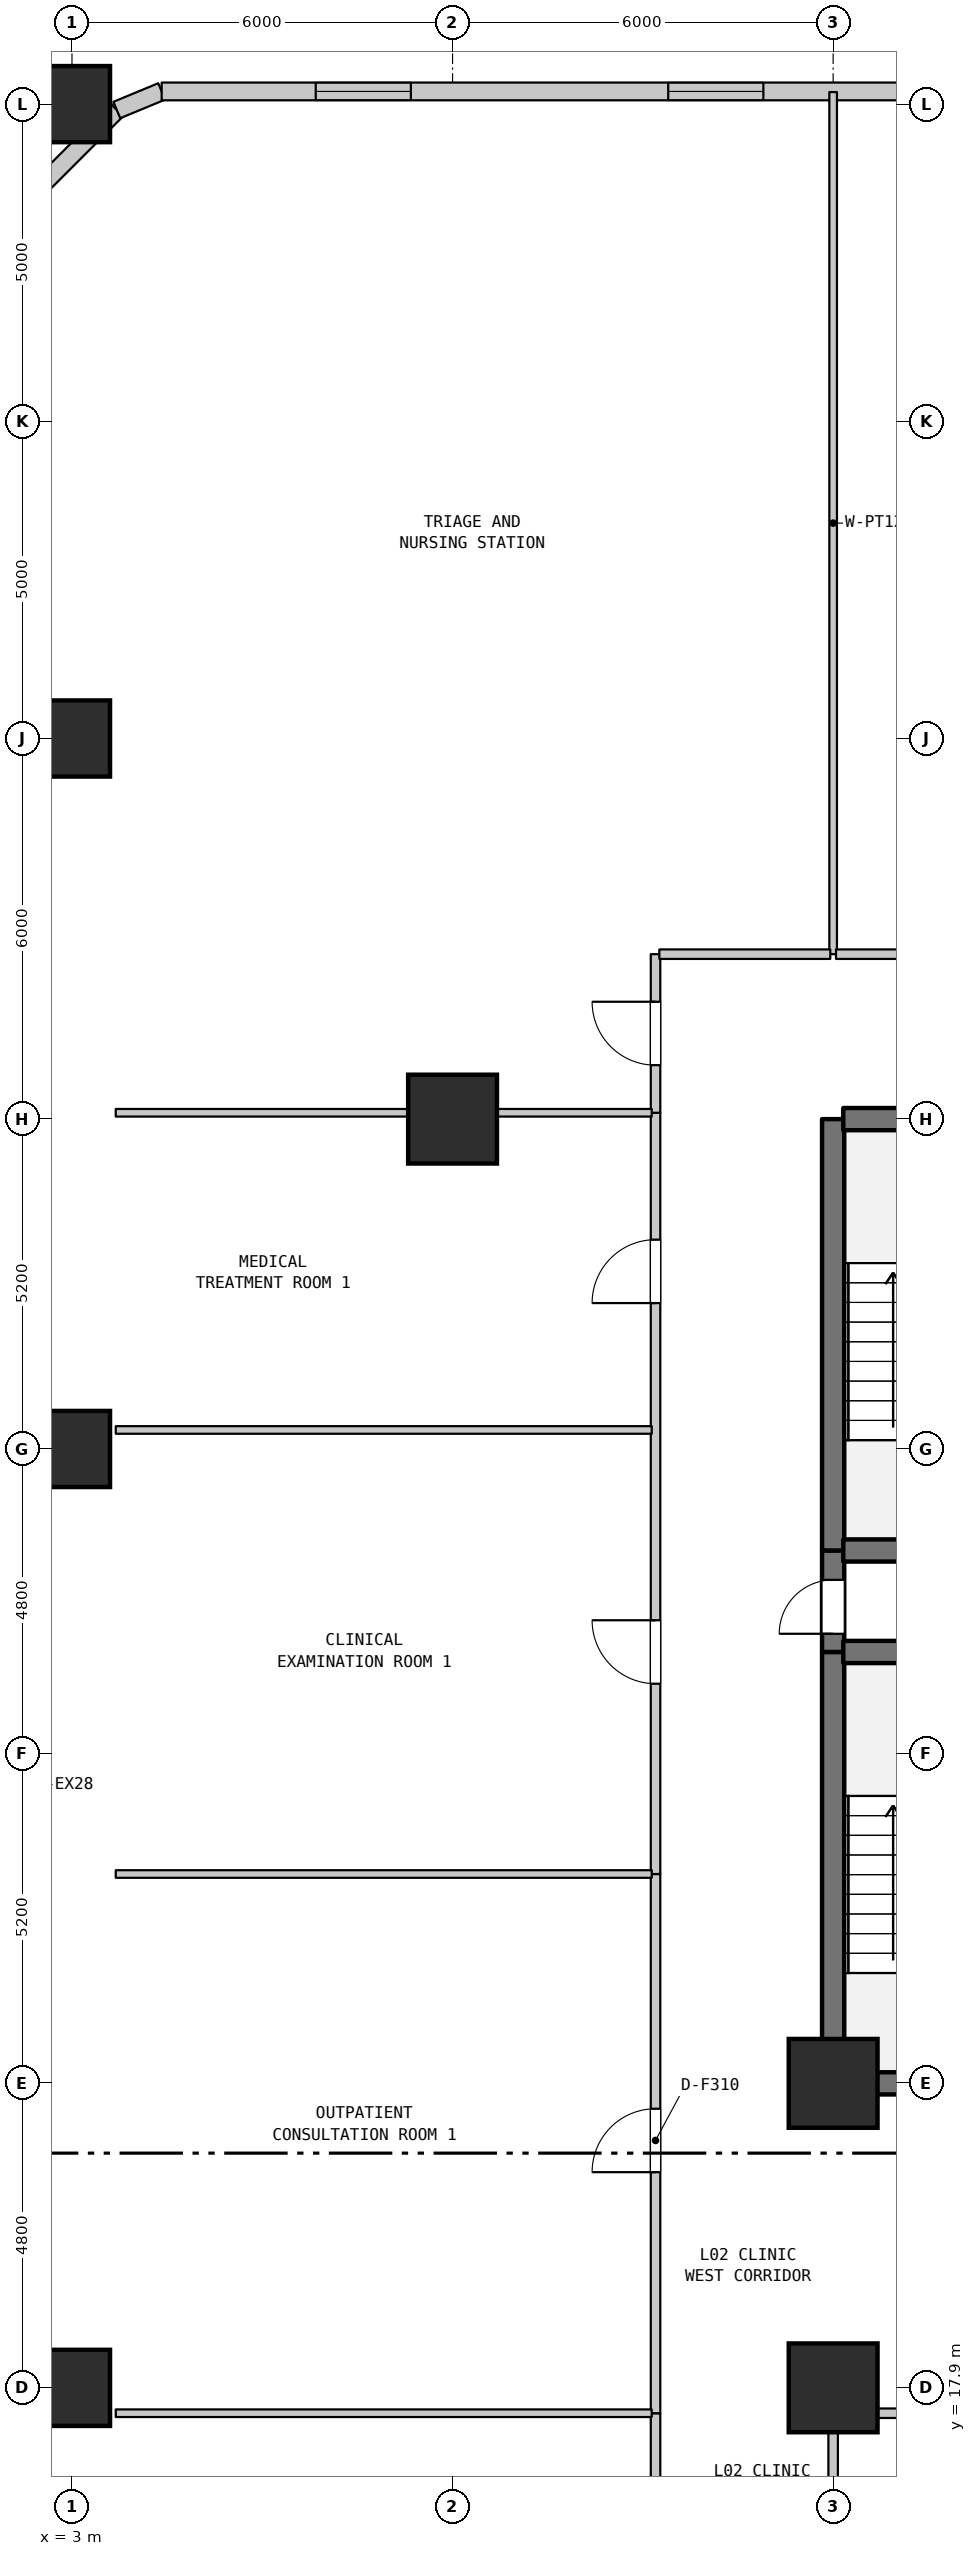
"""IFC4 building model, lengths in metres.
Left out: names, types, materials, properties, quantities, classifications, styles, units other than length and angle.
Written with IfcOpenShell. Run it as: python <this file> out.ifc"""

import sys

from ifc_helpers import new_model, si_unit, direction, frame, frame_2d, origin, origin_2d, place, context, subcontext, project, spatial, rectangle, extrude, element, fill, save


model = new_model("IFC4")
c1 = context("Model", 3, precision=1e-05, world=origin(), true_north=direction((0.0, 1.0)))
c2 = subcontext(c1, "Body", "Model", "MODEL_VIEW")
j1 = project(units=[si_unit("LENGTHUNIT", "METRE"), si_unit("PLANEANGLEUNIT", "RADIAN")], contexts=[c1])
p1 = place(None, origin())
s1 = spatial("IfcSite", under=j1, at=p1, CompositionType="ELEMENT")
p2 = place(p1, origin())
s2 = spatial("IfcBuilding", under=s1, at=p2, CompositionType="ELEMENT")
p3 = place(p2, frame((0.0, 0.0, 13.0)))
s3 = spatial("IfcBuildingStorey", under=s2, at=p3, CompositionType="ELEMENT", Elevation=13.0)
for number, where, z_axis, x_axis in (
    (1, (3.0, 17.9, 0.0), (0.0, 0.0, 1.0), (1.0, 0.0, 0.0)),
    (2, (3.0, 32.7, 0.0), (0.0, 0.0, 1.0), (1.0, 0.0, 0.0)),
    (3, (3.0, 43.9, 0.0), (0.0, 0.0, 1.0), (1.0, 0.0, 0.0)),
    (4, (3.0, 53.9, 0.0), (0.0, 0.0, 1.0), (1.0, 0.0, 0.0)),
):
    element("IfcColumn", number, at=place(p3, frame(where, z_axis=z_axis, x_axis=x_axis)), inside=s3, PredefinedType="PILASTER", context=c2, shape_type="SweptSolid", body=[
        extrude(rectangle(XDim=1.2, YDim=1.2, at=origin_2d()), origin(), (0.0, 0.0, 1.0), 6.0),
    ])
for number, where, z_axis, x_axis in (
    (5, (9.0, 37.9, 0.0), (0.0, 0.0, 1.0), (1.0, 0.0, 0.0)),
    (6, (15.0, 17.9, 0.0), (0.0, 0.0, 1.0), (1.0, 0.0, 0.0)),
    (7, (15.0, 22.7, 0.0), (0.0, 0.0, 1.0), (1.0, 0.0, 0.0)),
):
    element("IfcColumn", number, at=place(p3, frame(where, z_axis=z_axis, x_axis=x_axis)), inside=s3, PredefinedType="COLUMN", context=c2, shape_type="SweptSolid", body=[
        extrude(rectangle(XDim=1.4, YDim=1.4, at=origin_2d()), origin(), (0.0, 0.0, 1.0), 6.0),
    ])
p4 = place(p3, frame((2.293, 52.393, 0.0), z_axis=(0.0, 0.0, 1.0), x_axis=(0.707167825498, 0.707045731605, 0.0)))
e8 = element("IfcWall", 8, at=p4, inside=s3, PredefinedType="STANDARD", context=c2, shape_type="SweptSolid", body=[
    extrude(rectangle(XDim=2.0, YDim=0.28, at=frame_2d((1.0, 0.0))), origin(), (0.0, 0.0, 1.0), 5.58),
])
p5 = place(p3, frame((3.707, 53.807, 0.0), z_axis=(0.0, 0.0, 1.0), x_axis=(0.923717339373, 0.383074766777, 0.0)))
e9 = element("IfcWall", 9, at=p5, inside=s3, PredefinedType="STANDARD", context=c2, shape_type="SweptSolid", body=[
    extrude(rectangle(XDim=0.765, YDim=0.28, at=frame_2d((0.383, 0.0))), origin(), (0.0, 0.0, 1.0), 5.58),
])
p6 = place(p3, frame((4.414, 54.1, 0.0), z_axis=(0.0, 0.0, 1.0), x_axis=(1.0, 0.0, 0.0)))
e10 = element("IfcWall", 10, at=p6, inside=s3, PredefinedType="STANDARD", context=c2, shape_type="SweptSolid", body=[
    extrude(rectangle(XDim=28.586, YDim=0.28, at=frame_2d((14.293, 0.0))), origin(), (0.0, 0.0, 1.0), 5.58),
])
p7 = place(p6, frame((2.429, 0.0, 0.95)))
e11 = element("IfcOpeningElement", 11, at=p7, cuts=e10, PredefinedType="OPENING", context=c2, shape_type="SweptSolid", body=[
    extrude(rectangle(XDim=1.5, YDim=1.8, at=frame_2d((0.75, 0.9))), frame((0.0, 0.15, 0.0), z_axis=(0.0, -1.0, 0.0), x_axis=(1.0, 0.0, 0.0)), (0.0, 0.0, 1.0), 0.3),
])
p8 = place(p6, frame((7.986, 0.0, 0.95)))
e12 = element("IfcOpeningElement", 12, at=p8, cuts=e10, PredefinedType="OPENING", context=c2, shape_type="SweptSolid", body=[
    extrude(rectangle(XDim=1.5, YDim=1.8, at=frame_2d((0.75, 0.9))), frame((0.0, 0.15, 0.0), z_axis=(0.0, -1.0, 0.0), x_axis=(1.0, 0.0, 0.0)), (0.0, 0.0, 1.0), 0.3),
])
p9 = place(p6, frame((13.543, 0.0, 0.95)))
e13 = element("IfcOpeningElement", 13, at=p9, cuts=e10, PredefinedType="OPENING", context=c2, shape_type="SweptSolid", body=[
    extrude(rectangle(XDim=1.5, YDim=1.8, at=frame_2d((0.75, 0.9))), frame((0.0, 0.15, 0.0), z_axis=(0.0, -1.0, 0.0), x_axis=(1.0, 0.0, 0.0)), (0.0, 0.0, 1.0), 0.3),
])
p10 = place(p6, frame((19.55, 0.0, 0.95)))
e14 = element("IfcOpeningElement", 14, at=p10, cuts=e10, PredefinedType="OPENING", context=c2, shape_type="SweptSolid", body=[
    extrude(rectangle(XDim=1.5, YDim=1.8, at=frame_2d((0.75, 0.9))), frame((0.0, 0.15, 0.0), z_axis=(0.0, -1.0, 0.0), x_axis=(1.0, 0.0, 0.0)), (0.0, 0.0, 1.0), 0.3),
])
p11 = place(p6, frame((24.657, 0.0, 0.95)))
e15 = element("IfcOpeningElement", 15, at=p11, cuts=e10, PredefinedType="OPENING", context=c2, shape_type="SweptSolid", body=[
    extrude(rectangle(XDim=1.5, YDim=1.8, at=frame_2d((0.75, 0.9))), frame((0.0, 0.15, 0.0), z_axis=(0.0, -1.0, 0.0), x_axis=(1.0, 0.0, 0.0)), (0.0, 0.0, 1.0), 0.3),
])
p12 = place(p3, frame((12.2, 12.7, 0.0), z_axis=(0.0, 0.0, 1.0), x_axis=(0.0, 1.0, 0.0)))
e16 = element("IfcWall", 16, at=p12, inside=s3, PredefinedType="STANDARD", context=c2, shape_type="SweptSolid", body=[
    extrude(rectangle(XDim=4.8, YDim=0.15, at=frame_2d((2.4, 0.0))), origin(), (0.0, 0.0, 1.0), 5.58),
])
p13 = place(p12, frame((1.529, 0.0, 0.0)))
e17 = element("IfcOpeningElement", 17, at=p13, cuts=e16, PredefinedType="OPENING", context=c2, shape_type="SweptSolid", body=[
    extrude(rectangle(XDim=1.45, YDim=2.2, at=frame_2d((0.725, 1.1))), frame((0.0, 0.085, 0.0), z_axis=(0.0, -1.0, 0.0), x_axis=(1.0, 0.0, 0.0)), (0.0, 0.0, 1.0), 0.17),
])
p14 = place(p3, frame((12.2, 17.5, 0.0), z_axis=(0.0, 0.0, 1.0), x_axis=(0.0, 1.0, 0.0)))
e18 = element("IfcWall", 18, at=p14, inside=s3, PredefinedType="STANDARD", context=c2, shape_type="SweptSolid", body=[
    extrude(rectangle(XDim=8.5, YDim=0.15, at=frame_2d((4.25, 0.0))), origin(), (0.0, 0.0, 1.0), 5.58),
])
p15 = place(p14, frame((3.8, 0.0, 0.0)))
e19 = element("IfcOpeningElement", 19, at=p15, cuts=e18, PredefinedType="OPENING", context=c2, shape_type="SweptSolid", body=[
    extrude(rectangle(XDim=1.0, YDim=2.15, at=frame_2d((0.5, 1.075))), frame((0.0, 0.085, 0.0), z_axis=(0.0, -1.0, 0.0), x_axis=(1.0, 0.0, 0.0)), (0.0, 0.0, 1.0), 0.17),
])
p16 = place(p3, frame((12.2, 26.0, 0.0), z_axis=(0.0, 0.0, 1.0), x_axis=(0.0, 1.0, 0.0)))
e20 = element("IfcWall", 20, at=p16, inside=s3, PredefinedType="STANDARD", context=c2, shape_type="SweptSolid", body=[
    extrude(rectangle(XDim=12.0, YDim=0.15, at=frame_2d((6.0, 0.0))), origin(), (0.0, 0.0, 1.0), 5.58),
])
p17 = place(p16, frame((3.0, 0.0, 0.0)))
e21 = element("IfcOpeningElement", 21, at=p17, cuts=e20, PredefinedType="OPENING", context=c2, shape_type="SweptSolid", body=[
    extrude(rectangle(XDim=1.0, YDim=2.15, at=frame_2d((0.5, 1.075))), frame((0.0, 0.085, 0.0), z_axis=(0.0, -1.0, 0.0), x_axis=(1.0, 0.0, 0.0)), (0.0, 0.0, 1.0), 0.17),
])
p18 = place(p16, frame((9.0, 0.0, 0.0)))
e22 = element("IfcOpeningElement", 22, at=p18, cuts=e20, PredefinedType="OPENING", context=c2, shape_type="SweptSolid", body=[
    extrude(rectangle(XDim=1.0, YDim=2.15, at=frame_2d((0.5, 1.075))), frame((0.0, 0.085, 0.0), z_axis=(0.0, -1.0, 0.0), x_axis=(1.0, 0.0, 0.0)), (0.0, 0.0, 1.0), 0.17),
])
p19 = place(p3, frame((12.2, 38.0, 0.0), z_axis=(0.0, 0.0, 1.0), x_axis=(0.0, 1.0, 0.0)))
e23 = element("IfcWall", 23, at=p19, inside=s3, PredefinedType="STANDARD", context=c2, shape_type="SweptSolid", body=[
    extrude(rectangle(XDim=2.5, YDim=0.15, at=frame_2d((1.25, 0.0))), origin(), (0.0, 0.0, 1.0), 5.58),
])
p20 = place(p19, frame((0.75, 0.0, 0.0)))
e24 = element("IfcOpeningElement", 24, at=p20, cuts=e23, PredefinedType="OPENING", context=c2, shape_type="SweptSolid", body=[
    extrude(rectangle(XDim=1.0, YDim=2.15, at=frame_2d((0.5, 1.075))), frame((0.0, 0.085, 0.0), z_axis=(0.0, -1.0, 0.0), x_axis=(1.0, 0.0, 0.0)), (0.0, 0.0, 1.0), 0.17),
])
p21 = place(p3, frame((15.0, 12.7, 0.0), z_axis=(0.0, 0.0, 1.0), x_axis=(0.0, 1.0, 0.0)))
e25 = element("IfcWall", 25, at=p21, inside=s3, PredefinedType="STANDARD", context=c2, shape_type="SweptSolid", body=[
    extrude(rectangle(XDim=4.8, YDim=0.15, at=frame_2d((2.4, 0.0))), origin(), (0.0, 0.0, 1.0), 5.08),
])
p22 = place(p3, frame((15.0, 22.7, 0.0), z_axis=(0.0, 0.0, 1.0), x_axis=(0.0, 1.0, 0.0)))
e26 = element("IfcWall", 26, at=p22, inside=s3, PredefinedType="SHEAR", context=c2, shape_type="SweptSolid", body=[
    extrude(rectangle(XDim=6.8, YDim=0.35, at=frame_2d((3.4, 0.0))), origin(), (0.0, 0.0, 1.0), 5.58),
])
p23 = place(p3, frame((15.0, 29.5, 0.0), z_axis=(0.0, 0.0, 1.0), x_axis=(0.0, 1.0, 0.0)))
e27 = element("IfcWall", 27, at=p23, inside=s3, PredefinedType="SHEAR", context=c2, shape_type="SweptSolid", body=[
    extrude(rectangle(XDim=1.6, YDim=0.35, at=frame_2d((0.8, 0.0))), origin(), (0.0, 0.0, 1.0), 5.58),
])
p24 = place(p23, frame((0.287, 0.0, 0.0)))
e28 = element("IfcOpeningElement", 28, at=p24, cuts=e27, PredefinedType="OPENING", context=c2, shape_type="SweptSolid", body=[
    extrude(rectangle(XDim=0.85, YDim=2.1, at=frame_2d((0.425, 1.05))), frame((0.0, 0.185, 0.0), z_axis=(0.0, -1.0, 0.0), x_axis=(1.0, 0.0, 0.0)), (0.0, 0.0, 1.0), 0.37),
])
p25 = place(p3, frame((15.0, 31.1, 0.0), z_axis=(0.0, 0.0, 1.0), x_axis=(0.0, 1.0, 0.0)))
e29 = element("IfcWall", 29, at=p25, inside=s3, PredefinedType="SHEAR", context=c2, shape_type="SweptSolid", body=[
    extrude(rectangle(XDim=6.8, YDim=0.35, at=frame_2d((3.4, 0.0))), origin(), (0.0, 0.0, 1.0), 5.58),
])
p26 = place(p3, frame((15.0, 40.5, 0.0), z_axis=(0.0, 0.0, 1.0), x_axis=(0.0, 1.0, 0.0)))
e30 = element("IfcWall", 30, at=p26, inside=s3, PredefinedType="PARTITIONING", context=c2, shape_type="SweptSolid", body=[
    extrude(rectangle(XDim=13.59, YDim=0.12, at=frame_2d((6.795, 0.0))), origin(), (0.0, 0.0, 1.0), 5.58),
])
p27 = place(p3, frame((3.69, 17.5, 0.0), z_axis=(0.0, 0.0, 1.0), x_axis=(1.0, 0.0, 0.0)))
e31 = element("IfcWall", 31, at=p27, inside=s3, PredefinedType="PARTITIONING", context=c2, shape_type="SweptSolid", body=[
    extrude(rectangle(XDim=8.45, YDim=0.12, at=frame_2d((4.225, 0.0))), origin(), (0.0, 0.0, 1.0), 4.38),
])
p28 = place(p3, frame((15.06, 17.5, 0.0), z_axis=(0.0, 0.0, 1.0), x_axis=(1.0, 0.0, 0.0)))
e32 = element("IfcWall", 32, at=p28, inside=s3, PredefinedType="STANDARD", context=c2, shape_type="SweptSolid", body=[
    extrude(rectangle(XDim=8.295, YDim=0.15, at=frame_2d((4.147, 0.0))), origin(), (0.0, 0.0, 1.0), 5.58),
])
p29 = place(p28, frame((1.665, 0.0, 0.0)))
e33 = element("IfcOpeningElement", 33, at=p29, cuts=e32, PredefinedType="OPENING", context=c2, shape_type="SweptSolid", body=[
    extrude(rectangle(XDim=0.9, YDim=2.1, at=frame_2d((0.45, 1.05))), frame((0.0, 0.085, 0.0), z_axis=(0.0, -1.0, 0.0), x_axis=(1.0, 0.0, 0.0)), (0.0, 0.0, 1.0), 0.17),
])
p30 = place(p28, frame((5.715, 0.0, 0.0)))
e34 = element("IfcOpeningElement", 34, at=p30, cuts=e32, PredefinedType="OPENING", context=c2, shape_type="SweptSolid", body=[
    extrude(rectangle(XDim=0.9, YDim=2.1, at=frame_2d((0.45, 1.05))), frame((0.0, 0.085, 0.0), z_axis=(0.0, -1.0, 0.0), x_axis=(1.0, 0.0, 0.0)), (0.0, 0.0, 1.0), 0.17),
])
p31 = place(p3, frame((15.16, 22.7, 0.0), z_axis=(0.0, 0.0, 1.0), x_axis=(1.0, 0.0, 0.0)))
e35 = element("IfcWall", 35, at=p31, inside=s3, PredefinedType="SHEAR", context=c2, shape_type="SweptSolid", body=[
    extrude(rectangle(XDim=3.68, YDim=0.35, at=frame_2d((1.84, 0.0))), origin(), (0.0, 0.0, 1.0), 5.58),
])
p32 = place(p3, frame((3.69, 26.0, 0.0), z_axis=(0.0, 0.0, 1.0), x_axis=(1.0, 0.0, 0.0)))
e36 = element("IfcWall", 36, at=p32, inside=s3, PredefinedType="PARTITIONING", context=c2, shape_type="SweptSolid", body=[
    extrude(rectangle(XDim=8.45, YDim=0.12, at=frame_2d((4.225, 0.0))), origin(), (0.0, 0.0, 1.0), 5.58),
])
for number, where, z_axis, x_axis in (
    (37, (15.16, 29.5, 0.0), (0.0, 0.0, 1.0), (1.0, 0.0, 0.0)),
    (38, (15.16, 31.1, 0.0), (0.0, 0.0, 1.0), (1.0, 0.0, 0.0)),
):
    element("IfcWall", number, at=place(p3, frame(where, z_axis=z_axis, x_axis=x_axis)), inside=s3, PredefinedType="SHEAR", context=c2, shape_type="SweptSolid", body=[
        extrude(rectangle(XDim=3.68, YDim=0.35, at=frame_2d((1.84, 0.0))), origin(), (0.0, 0.0, 1.0), 5.58),
    ])
p33 = place(p3, frame((3.69, 33.0, 0.0), z_axis=(0.0, 0.0, 1.0), x_axis=(1.0, 0.0, 0.0)))
e39 = element("IfcWall", 39, at=p33, inside=s3, PredefinedType="PARTITIONING", context=c2, shape_type="SweptSolid", body=[
    extrude(rectangle(XDim=8.45, YDim=0.12, at=frame_2d((4.225, 0.0))), origin(), (0.0, 0.0, 1.0), 5.58),
])
p34 = place(p3, frame((15.16, 37.9, 0.0), z_axis=(0.0, 0.0, 1.0), x_axis=(1.0, 0.0, 0.0)))
e40 = element("IfcWall", 40, at=p34, inside=s3, PredefinedType="SHEAR", context=c2, shape_type="SweptSolid", body=[
    extrude(rectangle(XDim=3.68, YDim=0.35, at=frame_2d((1.84, 0.0))), origin(), (0.0, 0.0, 1.0), 5.58),
])
p35 = place(p3, frame((3.69, 38.0, 0.0), z_axis=(0.0, 0.0, 1.0), x_axis=(1.0, 0.0, 0.0)))
e41 = element("IfcWall", 41, at=p35, inside=s3, PredefinedType="PARTITIONING", context=c2, shape_type="SweptSolid", body=[
    extrude(rectangle(XDim=5.31, YDim=0.12, at=frame_2d((2.655, 0.0))), origin(), (0.0, 0.0, 1.0), 5.58),
])
p36 = place(p3, frame((12.26, 40.5, 0.0), z_axis=(0.0, 0.0, 1.0), x_axis=(1.0, 0.0, 0.0)))
e42 = element("IfcWall", 42, at=p36, inside=s3, PredefinedType="STANDARD", context=c2, shape_type="SweptSolid", body=[
    extrude(rectangle(XDim=2.695, YDim=0.15, at=frame_2d((1.348, 0.0))), origin(), (0.0, 0.0, 1.0), 5.58),
])
p37 = place(p3, frame((15.045, 40.5, 0.0), z_axis=(0.0, 0.0, 1.0), x_axis=(1.0, 0.0, 0.0)))
e43 = element("IfcWall", 43, at=p37, inside=s3, PredefinedType="STANDARD", context=c2, shape_type="SweptSolid", body=[
    extrude(rectangle(XDim=17.065, YDim=0.15, at=frame_2d((8.533, 0.0))), origin(), (0.0, 0.0, 1.0), 5.58),
])
p38 = place(p37, frame((3.705, 0.0, 0.0)))
e44 = element("IfcOpeningElement", 44, at=p38, cuts=e43, PredefinedType="OPENING", context=c2, shape_type="SweptSolid", body=[
    extrude(rectangle(XDim=1.0, YDim=2.15, at=frame_2d((0.5, 1.075))), frame((0.0, 0.085, 0.0), z_axis=(0.0, -1.0, 0.0), x_axis=(1.0, 0.0, 0.0)), (0.0, 0.0, 1.0), 0.17),
])
p39 = place(p37, frame((9.784, 0.0, 0.0)))
e45 = element("IfcOpeningElement", 45, at=p39, cuts=e43, PredefinedType="OPENING", context=c2, shape_type="SweptSolid", body=[
    extrude(rectangle(XDim=1.0, YDim=2.15, at=frame_2d((0.5, 1.075))), frame((0.0, 0.085, 0.0), z_axis=(0.0, -1.0, 0.0), x_axis=(1.0, 0.0, 0.0)), (0.0, 0.0, 1.0), 0.17),
])
p40 = place(p37, frame((14.265, 0.0, 0.0)))
e46 = element("IfcOpeningElement", 46, at=p40, cuts=e43, PredefinedType="OPENING", context=c2, shape_type="SweptSolid", body=[
    extrude(rectangle(XDim=1.0, YDim=2.15, at=frame_2d((0.5, 1.075))), frame((0.0, 0.085, 0.0), z_axis=(0.0, -1.0, 0.0), x_axis=(1.0, 0.0, 0.0)), (0.0, 0.0, 1.0), 0.17),
])
p41 = place(p3, frame((9.0, 38.0, 0.0), z_axis=(0.0, 0.0, 1.0), x_axis=(1.0, 0.0, 0.0)))
e47 = element("IfcWall", 47, at=p41, inside=s3, PredefinedType="PARTITIONING", context=c2, shape_type="SweptSolid", body=[
    extrude(rectangle(XDim=3.14, YDim=0.12, at=frame_2d((1.57, 0.0))), origin(), (0.0, 0.0, 1.0), 4.98),
])
p42 = place(p7, origin())
e48 = element("IfcWindow", 48, at=p42, inside=s3, PartitioningType="SINGLE_PANEL", PredefinedType="WINDOW", context=c2, shape_type="SweptSolid", body=[
    extrude(rectangle(XDim=1.5, YDim=1.8, at=frame_2d((0.75, 0.9))), frame((0.0, 0.03, 0.0), z_axis=(0.0, -1.0, 0.0), x_axis=(1.0, 0.0, 0.0)), (0.0, 0.0, 1.0), 0.06),
])
fill(e11, e48)
p43 = place(p8, origin())
e49 = element("IfcWindow", 49, at=p43, inside=s3, PartitioningType="SINGLE_PANEL", PredefinedType="WINDOW", context=c2, shape_type="SweptSolid", body=[
    extrude(rectangle(XDim=1.5, YDim=1.8, at=frame_2d((0.75, 0.9))), frame((0.0, 0.03, 0.0), z_axis=(0.0, -1.0, 0.0), x_axis=(1.0, 0.0, 0.0)), (0.0, 0.0, 1.0), 0.06),
])
fill(e12, e49)
p44 = place(p15, origin())
e50 = element("IfcDoor", 50, at=p44, inside=s3, OperationType="SINGLE_SWING_LEFT", PredefinedType="DOOR", context=c2, shape_type="SweptSolid", body=[
    extrude(rectangle(XDim=1.0, YDim=2.15, at=frame_2d((0.5, 1.075))), frame((0.0, 0.025, 0.0), z_axis=(0.0, -1.0, 0.0), x_axis=(1.0, 0.0, 0.0)), (0.0, 0.0, 1.0), 0.05),
])
fill(e19, e50)
p45 = place(p17, origin())
e51 = element("IfcDoor", 51, at=p45, inside=s3, OperationType="SINGLE_SWING_RIGHT", PredefinedType="DOOR", context=c2, shape_type="SweptSolid", body=[
    extrude(rectangle(XDim=1.0, YDim=2.15, at=frame_2d((0.5, 1.075))), frame((0.0, 0.025, 0.0), z_axis=(0.0, -1.0, 0.0), x_axis=(1.0, 0.0, 0.0)), (0.0, 0.0, 1.0), 0.05),
])
fill(e21, e51)
p46 = place(p18, origin())
e52 = element("IfcDoor", 52, at=p46, inside=s3, OperationType="SINGLE_SWING_LEFT", PredefinedType="DOOR", context=c2, shape_type="SweptSolid", body=[
    extrude(rectangle(XDim=1.0, YDim=2.15, at=frame_2d((0.5, 1.075))), frame((0.0, 0.025, 0.0), z_axis=(0.0, -1.0, 0.0), x_axis=(1.0, 0.0, 0.0)), (0.0, 0.0, 1.0), 0.05),
])
fill(e22, e52)
p47 = place(p20, origin())
e53 = element("IfcDoor", 53, at=p47, inside=s3, OperationType="SINGLE_SWING_RIGHT", PredefinedType="DOOR", context=c2, shape_type="SweptSolid", body=[
    extrude(rectangle(XDim=1.0, YDim=2.15, at=frame_2d((0.5, 1.075))), frame((0.0, 0.025, 0.0), z_axis=(0.0, -1.0, 0.0), x_axis=(1.0, 0.0, 0.0)), (0.0, 0.0, 1.0), 0.05),
])
fill(e24, e53)
p48 = place(p24, origin())
e54 = element("IfcDoor", 54, at=p48, inside=s3, OperationType="SINGLE_SWING_LEFT", PredefinedType="DOOR", context=c2, shape_type="SweptSolid", body=[
    extrude(rectangle(XDim=0.85, YDim=2.1, at=frame_2d((0.425, 1.05))), frame((0.0, 0.025, 0.0), z_axis=(0.0, -1.0, 0.0), x_axis=(1.0, 0.0, 0.0)), (0.0, 0.0, 1.0), 0.05),
])
fill(e28, e54)
save(model, sys.argv[1])
